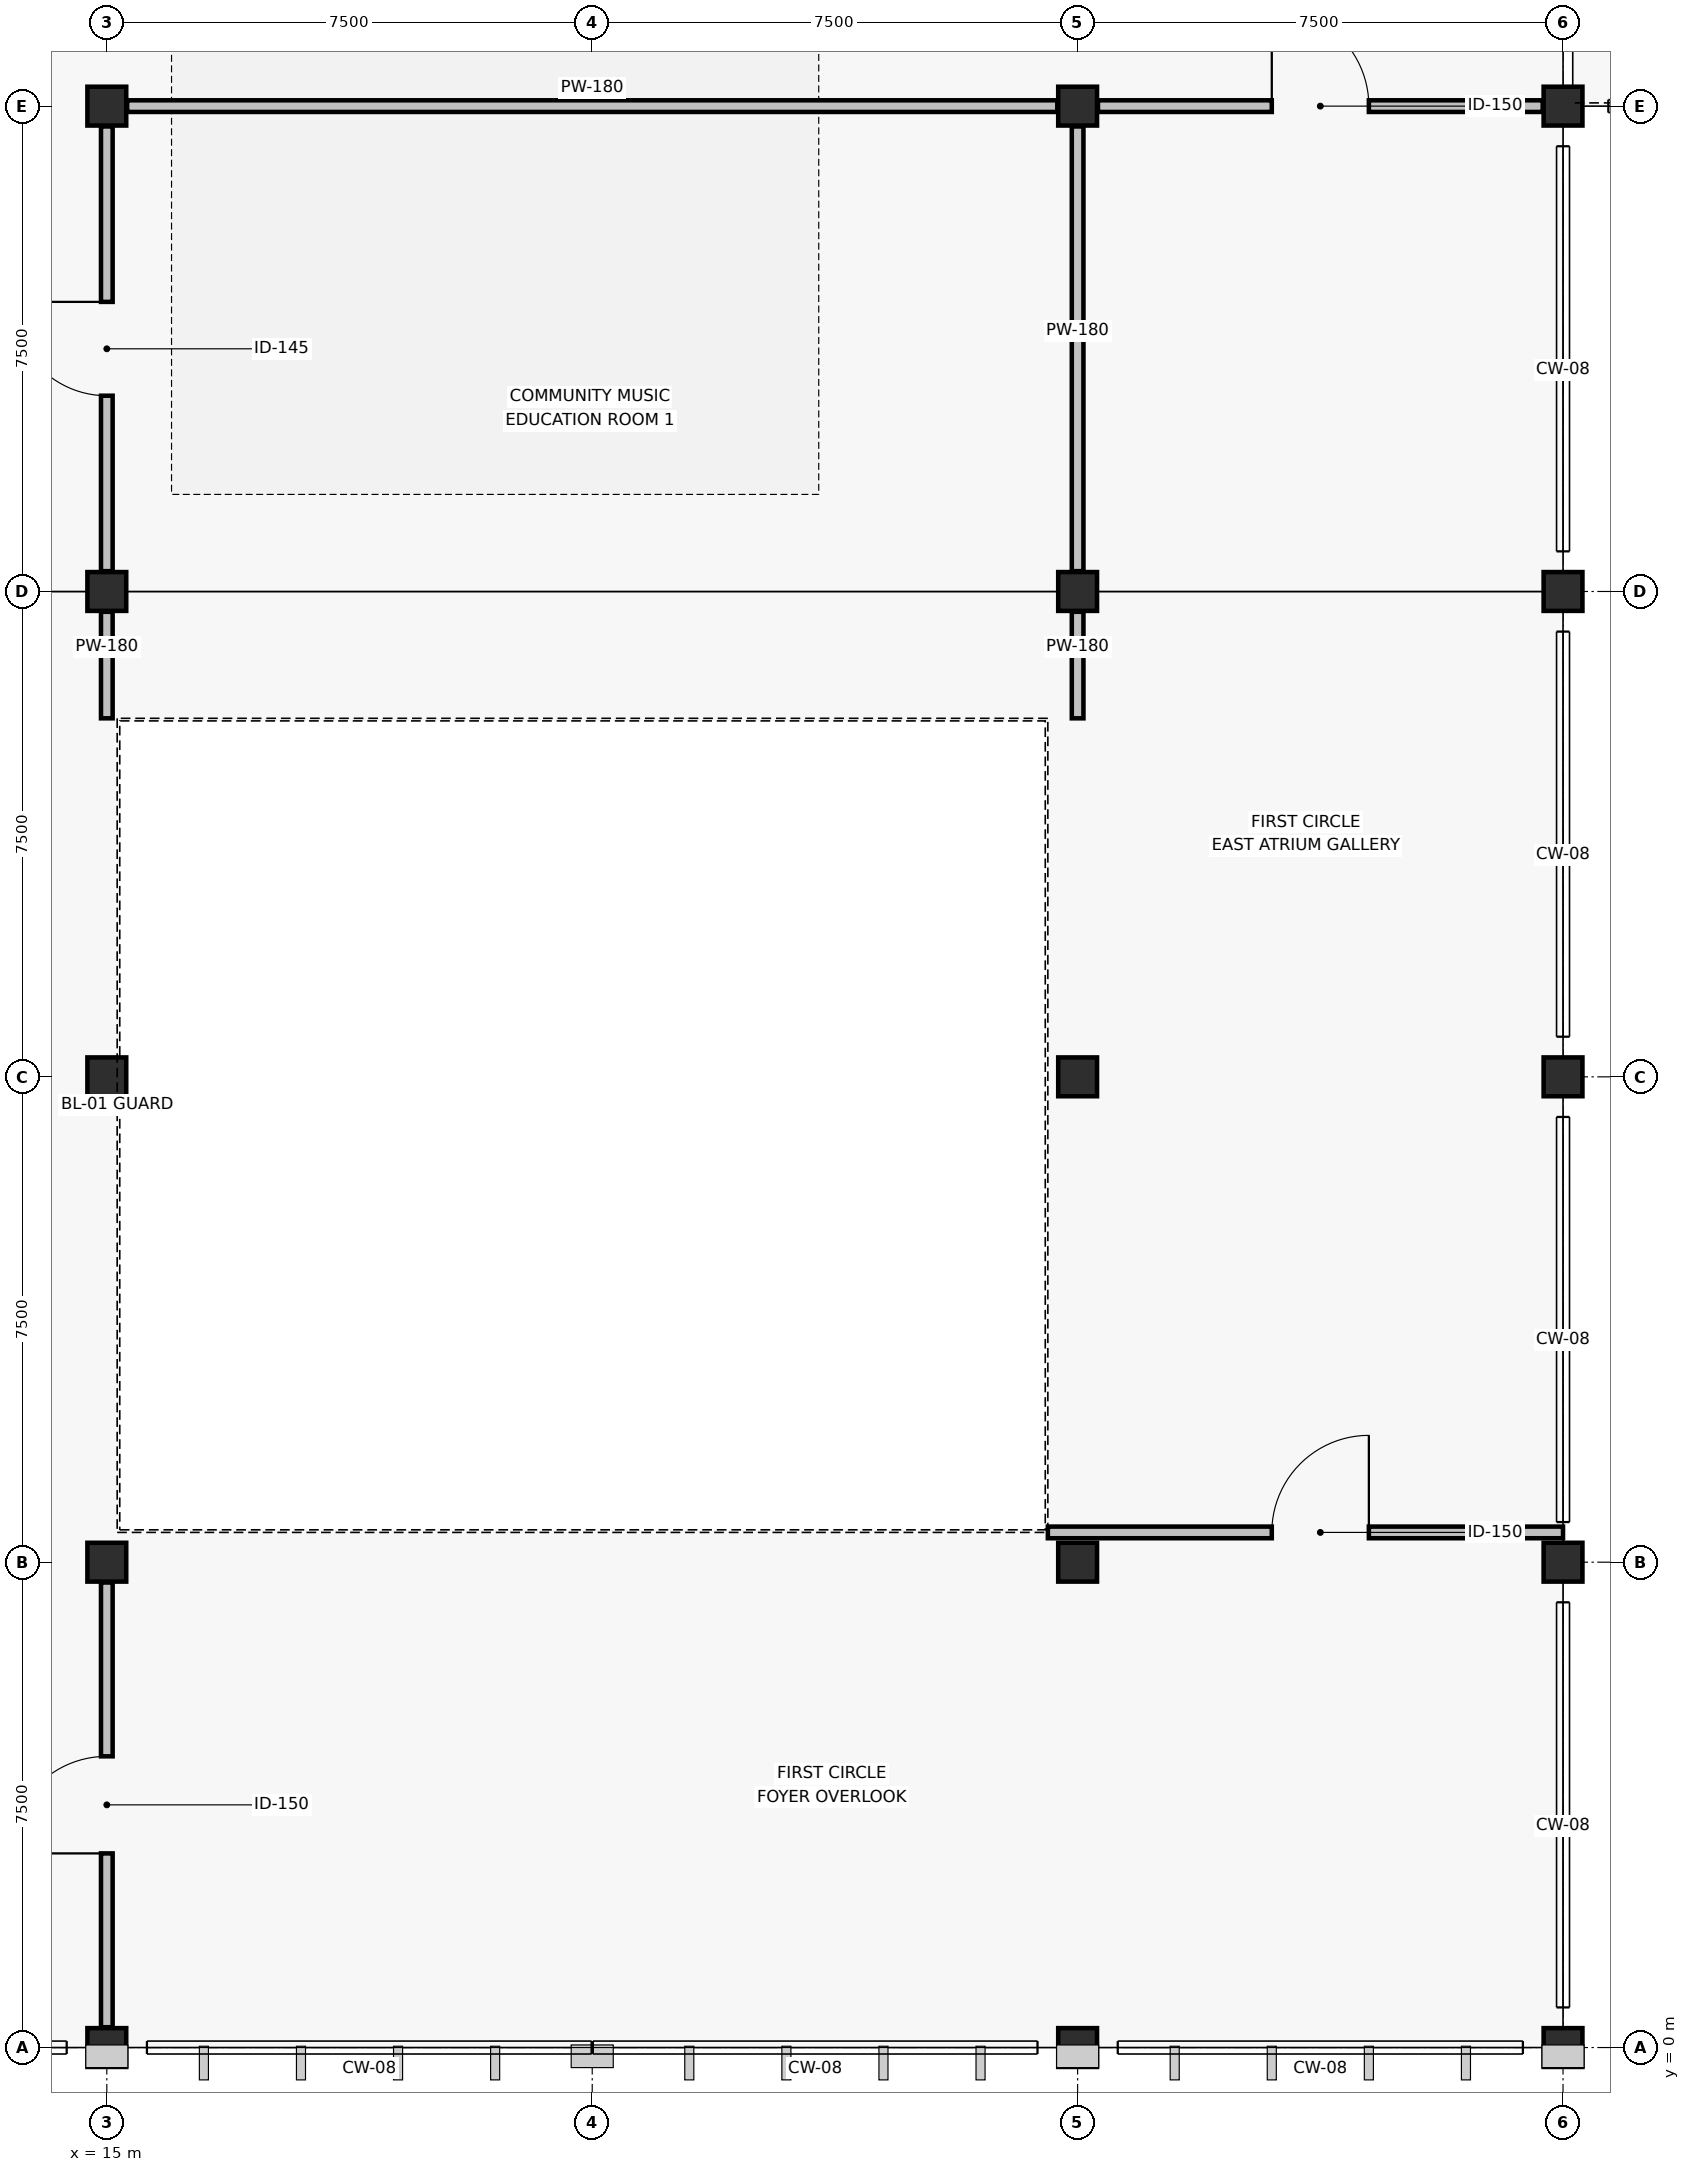
"""IFC4 building model, lengths in metres.
Left out: names, types, materials, properties, quantities, classifications, styles, units other than length and angle.
Written with IfcOpenShell. Run it as: python <this file> out.ifc"""

import sys

from ifc_helpers import new_model, si_unit, direction, frame, frame_2d, origin, origin_2d, place, context, subcontext, project, spatial, rectangle, extrude, element, fill, save


model = new_model("IFC4")
c1 = context("Model", 3, precision=1e-05, world=origin(), true_north=direction((0.0, 1.0)))
c2 = subcontext(c1, "Body", "Model", "MODEL_VIEW")
j1 = project(units=[si_unit("LENGTHUNIT", "METRE"), si_unit("PLANEANGLEUNIT", "RADIAN")], contexts=[c1])
p1 = place(None, origin())
s1 = spatial("IfcSite", under=j1, at=p1, CompositionType="ELEMENT")
p2 = place(p1, origin())
s2 = spatial("IfcBuilding", under=s1, at=p2, CompositionType="ELEMENT")
p3 = place(p2, frame((0.0, 0.0, 9.0)))
s3 = spatial("IfcBuildingStorey", under=s2, at=p3, CompositionType="ELEMENT", Elevation=9.0)
for number, where, z_axis, x_axis in (
    (1, (15.0, 0.0, 0.0), (0.0, 0.0, 1.0), (1.0, 0.0, 0.0)),
    (2, (15.0, 7.5, 0.0), (0.0, 0.0, 1.0), (1.0, 0.0, 0.0)),
    (3, (15.0, 15.0, 0.0), (0.0, 0.0, 1.0), (1.0, 0.0, 0.0)),
    (4, (15.0, 22.5, 0.0), (0.0, 0.0, 1.0), (1.0, 0.0, 0.0)),
    (5, (15.0, 30.0, 0.0), (0.0, 0.0, 1.0), (1.0, 0.0, 0.0)),
    (6, (30.0, 0.0, 0.0), (0.0, 0.0, 1.0), (1.0, 0.0, 0.0)),
    (7, (30.0, 7.5, 0.0), (0.0, 0.0, 1.0), (1.0, 0.0, 0.0)),
    (8, (30.0, 15.0, 0.0), (0.0, 0.0, 1.0), (1.0, 0.0, 0.0)),
    (9, (30.0, 22.5, 0.0), (0.0, 0.0, 1.0), (1.0, 0.0, 0.0)),
    (10, (30.0, 30.0, 0.0), (0.0, 0.0, 1.0), (1.0, 0.0, 0.0)),
    (11, (37.5, 0.0, 0.0), (0.0, 0.0, 1.0), (1.0, 0.0, 0.0)),
    (12, (37.5, 7.5, 0.0), (0.0, 0.0, 1.0), (1.0, 0.0, 0.0)),
    (13, (37.5, 15.0, 0.0), (0.0, 0.0, 1.0), (1.0, 0.0, 0.0)),
    (14, (37.5, 22.5, 0.0), (0.0, 0.0, 1.0), (1.0, 0.0, 0.0)),
    (15, (37.5, 30.0, 0.0), (0.0, 0.0, 1.0), (1.0, 0.0, 0.0)),
):
    element("IfcColumn", number, at=place(p3, frame(where, z_axis=z_axis, x_axis=x_axis)), inside=s3, PredefinedType="COLUMN", context=c2, shape_type="SweptSolid", body=[
        extrude(rectangle(XDim=0.6, YDim=0.6, at=origin_2d()), origin(), (0.0, 0.0, 1.0), 4.2),
    ])
p4 = place(p3, frame((29.54, 7.96, 0.0), z_axis=(0.0, 0.0, 1.0), x_axis=(1.0, 0.0, 0.0)))
e16 = element("IfcWall", 16, at=p4, inside=s3, PredefinedType="PARTITIONING", context=c2, shape_type="SweptSolid", body=[
    extrude(rectangle(XDim=7.96, YDim=0.18, at=frame_2d((3.98, 0.0))), origin(), (0.0, 0.0, 1.0), 2.87),
])
p5 = place(p4, frame((3.46, 0.0, 0.0)))
e17 = element("IfcOpeningElement", 17, at=p5, cuts=e16, PredefinedType="OPENING", context=c2, shape_type="SweptSolid", body=[
    extrude(rectangle(XDim=1.5, YDim=2.16, at=frame_2d((0.75, 1.08))), frame((0.0, 0.1, 0.0), z_axis=(0.0, -1.0, 0.0), x_axis=(1.0, 0.0, 0.0)), (0.0, 0.0, 1.0), 0.2),
])
p6 = place(p3, frame((15.314, 30.0, 0.0), z_axis=(0.0, 0.0, 1.0), x_axis=(1.0, 0.0, 0.0)))
e18 = element("IfcWall", 18, at=p6, inside=s3, PredefinedType="PARTITIONING", context=c2, shape_type="SweptSolid", body=[
    extrude(rectangle(XDim=14.372, YDim=0.18, at=frame_2d((7.186, 0.0))), origin(), (0.0, 0.0, 1.0), 2.87),
])
p7 = place(p3, frame((30.314, 30.0, 0.0), z_axis=(0.0, 0.0, 1.0), x_axis=(1.0, 0.0, 0.0)))
e19 = element("IfcWall", 19, at=p7, inside=s3, PredefinedType="PARTITIONING", context=c2, shape_type="SweptSolid", body=[
    extrude(rectangle(XDim=6.872, YDim=0.18, at=frame_2d((3.436, 0.0))), origin(), (0.0, 0.0, 1.0), 2.87),
])
p8 = place(p7, frame((2.686, 0.0, 0.0)))
e20 = element("IfcOpeningElement", 20, at=p8, cuts=e19, PredefinedType="OPENING", context=c2, shape_type="SweptSolid", body=[
    extrude(rectangle(XDim=1.5, YDim=2.16, at=frame_2d((0.75, 1.08))), frame((0.0, 0.1, 0.0), z_axis=(0.0, -1.0, 0.0), x_axis=(1.0, 0.0, 0.0)), (0.0, 0.0, 1.0), 0.2),
])
p9 = place(p3, frame((30.0, 20.54, 0.0), z_axis=(0.0, 0.0, 1.0), x_axis=(0.0, 1.0, 0.0)))
e21 = element("IfcWall", 21, at=p9, inside=s3, PredefinedType="PARTITIONING", context=c2, shape_type="SweptSolid", body=[
    extrude(rectangle(XDim=1.646, YDim=0.18, at=frame_2d((0.823, 0.0))), origin(), (0.0, 0.0, 1.0), 2.82),
])
p10 = place(p3, frame((30.0, 22.814, 0.0), z_axis=(0.0, 0.0, 1.0), x_axis=(0.0, 1.0, 0.0)))
e22 = element("IfcWall", 22, at=p10, inside=s3, PredefinedType="PARTITIONING", context=c2, shape_type="SweptSolid", body=[
    extrude(rectangle(XDim=6.872, YDim=0.18, at=frame_2d((3.436, 0.0))), origin(), (0.0, 0.0, 1.0), 2.82),
])
p11 = place(p3, frame((15.0, 0.314, 0.0), z_axis=(0.0, 0.0, 1.0), x_axis=(0.0, 1.0, 0.0)))
e23 = element("IfcWall", 23, at=p11, inside=s3, PredefinedType="PARTITIONING", context=c2, shape_type="SweptSolid", body=[
    extrude(rectangle(XDim=6.872, YDim=0.18, at=frame_2d((3.436, 0.0))), origin(), (0.0, 0.0, 1.0), 2.87),
])
p12 = place(p11, frame((2.686, 0.0, 0.0)))
e24 = element("IfcOpeningElement", 24, at=p12, cuts=e23, PredefinedType="OPENING", context=c2, shape_type="SweptSolid", body=[
    extrude(rectangle(XDim=1.5, YDim=2.16, at=frame_2d((0.75, 1.08))), frame((0.0, 0.1, 0.0), z_axis=(0.0, -1.0, 0.0), x_axis=(1.0, 0.0, 0.0)), (0.0, 0.0, 1.0), 0.2),
])
p13 = place(p3, frame((15.0, 20.54, 0.0), z_axis=(0.0, 0.0, 1.0), x_axis=(0.0, 1.0, 0.0)))
e25 = element("IfcWall", 25, at=p13, inside=s3, PredefinedType="PARTITIONING", context=c2, shape_type="SweptSolid", body=[
    extrude(rectangle(XDim=1.646, YDim=0.18, at=frame_2d((0.823, 0.0))), origin(), (0.0, 0.0, 1.0), 2.87),
])
p14 = place(p3, frame((15.0, 22.814, 0.0), z_axis=(0.0, 0.0, 1.0), x_axis=(0.0, 1.0, 0.0)))
e26 = element("IfcWall", 26, at=p14, inside=s3, PredefinedType="PARTITIONING", context=c2, shape_type="SweptSolid", body=[
    extrude(rectangle(XDim=6.872, YDim=0.18, at=frame_2d((3.436, 0.0))), origin(), (0.0, 0.0, 1.0), 2.87),
])
p15 = place(p14, frame((2.711, 0.0, 0.0)))
e27 = element("IfcOpeningElement", 27, at=p15, cuts=e26, PredefinedType="OPENING", context=c2, shape_type="SweptSolid", body=[
    extrude(rectangle(XDim=1.45, YDim=2.15, at=frame_2d((0.725, 1.075))), frame((0.0, 0.1, 0.0), z_axis=(0.0, -1.0, 0.0), x_axis=(1.0, 0.0, 0.0)), (0.0, 0.0, 1.0), 0.2),
])
p16 = place(p5, origin())
e28 = element("IfcDoor", 28, at=p16, inside=s3, OperationType="SINGLE_SWING_RIGHT", PredefinedType="DOOR", context=c2, shape_type="SweptSolid", body=[
    extrude(rectangle(XDim=1.5, YDim=2.16, at=frame_2d((0.75, 1.08))), frame((0.0, 0.025, 0.0), z_axis=(0.0, -1.0, 0.0), x_axis=(1.0, 0.0, 0.0)), (0.0, 0.0, 1.0), 0.05),
])
fill(e17, e28)
p17 = place(p8, origin())
e29 = element("IfcDoor", 29, at=p17, inside=s3, OperationType="SINGLE_SWING_LEFT", PredefinedType="DOOR", context=c2, shape_type="SweptSolid", body=[
    extrude(rectangle(XDim=1.5, YDim=2.16, at=frame_2d((0.75, 1.08))), frame((0.0, 0.025, 0.0), z_axis=(0.0, -1.0, 0.0), x_axis=(1.0, 0.0, 0.0)), (0.0, 0.0, 1.0), 0.05),
])
fill(e20, e29)
p18 = place(p12, origin())
e30 = element("IfcDoor", 30, at=p18, inside=s3, OperationType="SINGLE_SWING_LEFT", PredefinedType="DOOR", context=c2, shape_type="SweptSolid", body=[
    extrude(rectangle(XDim=1.5, YDim=2.16, at=frame_2d((0.75, 1.08))), frame((0.0, 0.025, 0.0), z_axis=(0.0, -1.0, 0.0), x_axis=(1.0, 0.0, 0.0)), (0.0, 0.0, 1.0), 0.05),
])
fill(e24, e30)
p19 = place(p15, origin())
e31 = element("IfcDoor", 31, at=p19, inside=s3, OperationType="SINGLE_SWING_RIGHT", PredefinedType="DOOR", context=c2, shape_type="SweptSolid", body=[
    extrude(rectangle(XDim=1.45, YDim=2.15, at=frame_2d((0.725, 1.075))), frame((0.0, 0.025, 0.0), z_axis=(0.0, -1.0, 0.0), x_axis=(1.0, 0.0, 0.0)), (0.0, 0.0, 1.0), 0.05),
])
fill(e27, e31)
save(model, sys.argv[1])
